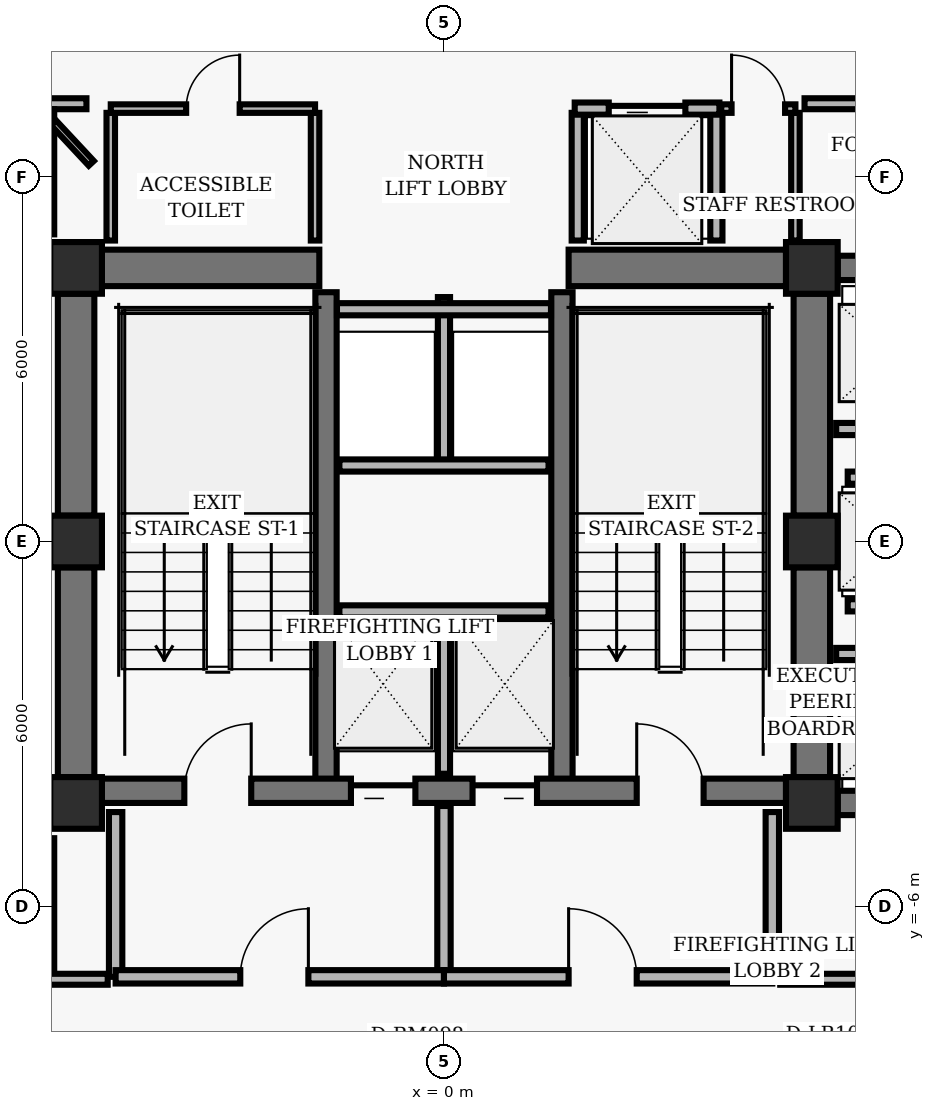
"""IFC4 building model, lengths in metres.
Left out: names, types, materials, properties, quantities, classifications, styles, units other than length and angle.
Written with IfcOpenShell. Run it as: python <this file> out.ifc"""

import sys

from ifc_helpers import new_model, si_unit, direction, frame, frame_2d, origin, origin_2d, place, context, subcontext, project, spatial, rectangle, hollow_rectangle, extrude, element, fill, save


model = new_model("IFC4")
c1 = context("Model", 3, precision=1e-05, world=origin(), true_north=direction((0.0, 1.0)))
c2 = subcontext(c1, "Body", "Model", "MODEL_VIEW")
j1 = project(units=[si_unit("LENGTHUNIT", "METRE"), si_unit("PLANEANGLEUNIT", "RADIAN")], contexts=[c1])
p1 = place(None, origin())
s1 = spatial("IfcSite", under=j1, at=p1, CompositionType="ELEMENT")
p2 = place(p1, origin())
s2 = spatial("IfcBuilding", under=s1, at=p2, CompositionType="ELEMENT")
p3 = place(p2, frame((0.0, 0.0, 159.36)))
s3 = spatial("IfcBuildingStorey", under=s2, at=p3, CompositionType="ELEMENT", Elevation=159.36)
for number, where, z_axis, x_axis in (
    (1, (-6.05, 4.5, 0.0), (0.0, 0.0, 1.0), (1.0, 0.0, 0.0)),
    (2, (6.05, 4.5, 0.0), (0.0, 0.0, 1.0), (1.0, 0.0, 0.0)),
    (3, (-6.05, 0.0, 0.0), (0.0, 0.0, 1.0), (1.0, 0.0, 0.0)),
    (4, (6.05, 0.0, 0.0), (0.0, 0.0, 1.0), (1.0, 0.0, 0.0)),
    (5, (-6.05, -4.3, 0.0), (0.0, 0.0, 1.0), (1.0, 0.0, 0.0)),
    (6, (6.05, -4.3, 0.0), (0.0, 0.0, 1.0), (1.0, 0.0, 0.0)),
):
    element("IfcColumn", number, at=place(p3, frame(where, z_axis=z_axis, x_axis=x_axis)), inside=s3, PredefinedType="COLUMN", context=c2, shape_type="SweptSolid", body=[
        extrude(hollow_rectangle(XDim=0.85, YDim=0.85, WallThickness=0.055, InnerFilletRadius=0.02, OuterFilletRadius=0.04, at=origin_2d()), origin(), (0.0, 0.0, 1.0), 3.04),
    ])
p4 = place(p3, frame((-6.05, 0.425, 0.0), z_axis=(0.0, 0.0, 1.0), x_axis=(0.0, 1.0, 0.0)))
e7 = element("IfcWall", 7, at=p4, inside=s3, PredefinedType="SHEAR", context=c2, shape_type="SweptSolid", body=[
    extrude(rectangle(XDim=3.65, YDim=0.6, at=frame_2d((1.825, 0.0))), origin(), (0.0, 0.0, 1.0), 2.788),
])
p5 = place(p3, frame((-6.05, -3.875, 0.0), z_axis=(0.0, 0.0, 1.0), x_axis=(0.0, 1.0, 0.0)))
e8 = element("IfcWall", 8, at=p5, inside=s3, PredefinedType="SHEAR", context=c2, shape_type="SweptSolid", body=[
    extrude(rectangle(XDim=3.45, YDim=0.6, at=frame_2d((1.725, 0.0))), origin(), (0.0, 0.0, 1.0), 2.788),
])
p6 = place(p3, frame((6.05, 0.425, 0.0), z_axis=(0.0, 0.0, 1.0), x_axis=(0.0, 1.0, 0.0)))
e9 = element("IfcWall", 9, at=p6, inside=s3, PredefinedType="SHEAR", context=c2, shape_type="SweptSolid", body=[
    extrude(rectangle(XDim=3.65, YDim=0.6, at=frame_2d((1.825, 0.0))), origin(), (0.0, 0.0, 1.0), 2.788),
])
p7 = place(p3, frame((6.05, -3.875, 0.0), z_axis=(0.0, 0.0, 1.0), x_axis=(0.0, 1.0, 0.0)))
e10 = element("IfcWall", 10, at=p7, inside=s3, PredefinedType="SHEAR", context=c2, shape_type="SweptSolid", body=[
    extrude(rectangle(XDim=3.45, YDim=0.6, at=frame_2d((1.725, 0.0))), origin(), (0.0, 0.0, 1.0), 2.788),
])
for number, where, z_axis, x_axis in (
    (11, (-1.94, -4.1, 0.0), (0.0, 0.0, 1.0), (0.0, 1.0, 0.0)),
    (12, (1.94, -4.1, 0.0), (0.0, 0.0, 1.0), (0.0, 1.0, 0.0)),
):
    element("IfcWall", number, at=place(p3, frame(where, z_axis=z_axis, x_axis=x_axis)), inside=s3, PredefinedType="SHEAR", context=c2, shape_type="SweptSolid", body=[
        extrude(rectangle(XDim=8.2, YDim=0.35, at=frame_2d((4.1, 0.0))), origin(), (0.0, 0.0, 1.0), 2.788),
    ])
p8 = place(p3, frame((-5.625, -4.1, 0.0), z_axis=(0.0, 0.0, 1.0), x_axis=(1.0, 0.0, 0.0)))
e13 = element("IfcWall", 13, at=p8, inside=s3, PredefinedType="SHEAR", context=c2, shape_type="SweptSolid", body=[
    extrude(rectangle(XDim=11.25, YDim=0.4, at=frame_2d((5.625, 0.0))), origin(), (0.0, 0.0, 1.0), 2.788),
])
p9 = place(p8, frame((1.355, 0.0, 0.0)))
e14 = element("IfcOpeningElement", 14, at=p9, cuts=e13, PredefinedType="OPENING", context=c2, shape_type="SweptSolid", body=[
    extrude(rectangle(XDim=1.1, YDim=2.04, at=frame_2d((0.55, 1.02))), frame((0.0, 0.21, 0.0), z_axis=(0.0, -1.0, 0.0), x_axis=(1.0, 0.0, 0.0)), (0.0, 0.0, 1.0), 0.42),
])
p10 = place(p8, frame((8.795, 0.0, 0.0)))
e15 = element("IfcOpeningElement", 15, at=p10, cuts=e13, PredefinedType="OPENING", context=c2, shape_type="SweptSolid", body=[
    extrude(rectangle(XDim=1.1, YDim=2.04, at=frame_2d((0.55, 1.02))), frame((0.0, 0.21, 0.0), z_axis=(0.0, -1.0, 0.0), x_axis=(1.0, 0.0, 0.0)), (0.0, 0.0, 1.0), 0.42),
])
p11 = place(p8, frame((4.095, 0.0, 0.0)))
e16 = element("IfcOpeningElement", 16, at=p11, cuts=e13, PredefinedType="OPENING", context=c2, shape_type="SweptSolid", body=[
    extrude(rectangle(XDim=1.06, YDim=2.04, at=frame_2d((0.53, 1.02))), frame((0.0, 0.21, 0.0), z_axis=(0.0, -1.0, 0.0), x_axis=(1.0, 0.0, 0.0)), (0.0, 0.0, 1.0), 0.42),
])
p12 = place(p8, frame((6.095, 0.0, 0.0)))
e17 = element("IfcOpeningElement", 17, at=p12, cuts=e13, PredefinedType="OPENING", context=c2, shape_type="SweptSolid", body=[
    extrude(rectangle(XDim=1.06, YDim=2.04, at=frame_2d((0.53, 1.02))), frame((0.0, 0.21, 0.0), z_axis=(0.0, -1.0, 0.0), x_axis=(1.0, 0.0, 0.0)), (0.0, 0.0, 1.0), 0.42),
])
for number, where, z_axis, x_axis in (
    (18, (-5.625, 4.5, 0.0), (0.0, 0.0, 1.0), (1.0, 0.0, 0.0)),
    (19, (2.05, 4.5, 0.0), (0.0, 0.0, 1.0), (1.0, 0.0, 0.0)),
):
    element("IfcWall", number, at=place(p3, frame(where, z_axis=z_axis, x_axis=x_axis)), inside=s3, PredefinedType="SHEAR", context=c2, shape_type="SweptSolid", body=[
        extrude(rectangle(XDim=3.575, YDim=0.6, at=frame_2d((1.788, 0.0))), origin(), (0.0, 0.0, 1.0), 2.788),
    ])
for number, where, z_axis, x_axis in (
    (20, (6.475, 4.5, 0.0), (0.0, 0.0, 1.0), (1.0, 0.0, 0.0)),
    (21, (6.475, -4.3, 0.0), (0.0, 0.0, 1.0), (1.0, 0.0, 0.0)),
):
    element("IfcWall", number, at=place(p3, frame(where, z_axis=z_axis, x_axis=x_axis)), inside=s3, PredefinedType="SHEAR", context=c2, shape_type="SweptSolid", body=[
        extrude(rectangle(XDim=2.05, YDim=0.4, at=frame_2d((1.025, 0.0))), origin(), (0.0, 0.0, 1.0), 2.788),
    ])
p13 = place(p3, frame((0.0, -3.82, 0.0), z_axis=(0.0, 0.0, 1.0), x_axis=(0.0, 1.0, 0.0)))
e22 = element("IfcWall", 22, at=p13, inside=s3, PredefinedType="PARTITIONING", context=c2, shape_type="SweptSolid", body=[
    extrude(rectangle(XDim=2.67, YDim=0.2, at=frame_2d((1.335, 0.0))), origin(), (0.0, 0.0, 1.0), 2.763),
])
p14 = place(p3, frame((-1.72, -1.15, 0.0), z_axis=(0.0, 0.0, 1.0), x_axis=(1.0, 0.0, 0.0)))
e23 = element("IfcWall", 23, at=p14, inside=s3, PredefinedType="PARTITIONING", context=c2, shape_type="SweptSolid", body=[
    extrude(rectangle(XDim=3.44, YDim=0.2, at=frame_2d((1.72, 0.0))), origin(), (0.0, 0.0, 1.0), 2.763),
])
for number, where, z_axis, x_axis in (
    (24, (-5.4, -7.16, 0.0), (0.0, 0.0, 1.0), (0.0, 1.0, 0.0)),
    (25, (5.4, -7.16, 0.0), (0.0, 0.0, 1.0), (0.0, 1.0, 0.0)),
):
    element("IfcWall", number, at=place(p3, frame(where, z_axis=z_axis, x_axis=x_axis)), inside=s3, PredefinedType="PARTITIONING", context=c2, shape_type="SweptSolid", body=[
        extrude(rectangle(XDim=2.71, YDim=0.22, at=frame_2d((1.355, 0.0))), origin(), (0.0, 0.0, 1.0), 2.763),
    ])
p15 = place(p3, frame((0.0, -7.16, 0.0), z_axis=(0.0, 0.0, 1.0), x_axis=(0.0, 1.0, 0.0)))
e26 = element("IfcWall", 26, at=p15, inside=s3, PredefinedType="PARTITIONING", context=c2, shape_type="SweptSolid", body=[
    extrude(rectangle(XDim=2.81, YDim=0.22, at=frame_2d((1.405, 0.0))), origin(), (0.0, 0.0, 1.0), 2.763),
])
p16 = place(p3, frame((-5.4, -7.16, 0.0), z_axis=(0.0, 0.0, 1.0), x_axis=(1.0, 0.0, 0.0)))
e27 = element("IfcWall", 27, at=p16, inside=s3, PredefinedType="PARTITIONING", context=c2, shape_type="SweptSolid", body=[
    extrude(rectangle(XDim=5.4, YDim=0.22, at=frame_2d((2.7, 0.0))), origin(), (0.0, 0.0, 1.0), 2.33),
])
p17 = place(p16, frame((2.05, 0.0, 0.0)))
e28 = element("IfcOpeningElement", 28, at=p17, cuts=e27, PredefinedType="OPENING", context=c2, shape_type="SweptSolid", body=[
    extrude(rectangle(XDim=1.12, YDim=2.02, at=frame_2d((0.56, 1.01))), frame((0.0, 0.12, 0.0), z_axis=(0.0, -1.0, 0.0), x_axis=(1.0, 0.0, 0.0)), (0.0, 0.0, 1.0), 0.24),
])
p18 = place(p3, frame((0.0, -7.16, 0.0), z_axis=(0.0, 0.0, 1.0), x_axis=(1.0, 0.0, 0.0)))
e29 = element("IfcWall", 29, at=p18, inside=s3, PredefinedType="PARTITIONING", context=c2, shape_type="SweptSolid", body=[
    extrude(rectangle(XDim=5.4, YDim=0.22, at=frame_2d((2.7, 0.0))), origin(), (0.0, 0.0, 1.0), 2.33),
])
p19 = place(p18, frame((2.05, 0.0, 0.0)))
e30 = element("IfcOpeningElement", 30, at=p19, cuts=e29, PredefinedType="OPENING", context=c2, shape_type="SweptSolid", body=[
    extrude(rectangle(XDim=1.12, YDim=2.02, at=frame_2d((0.56, 1.01))), frame((0.0, 0.12, 0.0), z_axis=(0.0, -1.0, 0.0), x_axis=(1.0, 0.0, 0.0)), (0.0, 0.0, 1.0), 0.24),
])
p20 = place(p3, frame((0.0, 1.25, 0.0), z_axis=(0.0, 0.0, 1.0), x_axis=(0.0, 1.0, 0.0)))
e31 = element("IfcWall", 31, at=p20, inside=s3, PredefinedType="PARTITIONING", context=c2, shape_type="SweptSolid", body=[
    extrude(rectangle(XDim=2.77, YDim=0.2, at=frame_2d((1.385, 0.0))), origin(), (0.0, 0.0, 1.0), 2.763),
])
p21 = place(p3, frame((-1.72, 1.25, 0.0), z_axis=(0.0, 0.0, 1.0), x_axis=(1.0, 0.0, 0.0)))
e32 = element("IfcWall", 32, at=p21, inside=s3, PredefinedType="PARTITIONING", context=c2, shape_type="SweptSolid", body=[
    extrude(rectangle(XDim=3.44, YDim=0.2, at=frame_2d((1.72, 0.0))), origin(), (0.0, 0.0, 1.0), 2.763),
])
p22 = place(p3, frame((-1.76, 3.82, 0.0), z_axis=(0.0, 0.0, 1.0), x_axis=(1.0, 0.0, 0.0)))
e33 = element("IfcWall", 33, at=p22, inside=s3, PredefinedType="PARTITIONING", context=c2, shape_type="SweptSolid", body=[
    extrude(rectangle(XDim=3.52, YDim=0.2, at=frame_2d((1.76, 0.0))), origin(), (0.0, 0.0, 1.0), 2.763),
])
for number, where, z_axis, x_axis in (
    (34, (2.2, 4.95, 0.0), (0.0, 0.0, 1.0), (0.0, 1.0, 0.0)),
    (35, (4.48, 4.95, 0.0), (0.0, 0.0, 1.0), (0.0, 1.0, 0.0)),
):
    element("IfcWall", number, at=place(p3, frame(where, z_axis=z_axis, x_axis=x_axis)), inside=s3, PredefinedType="PARTITIONING", context=c2, shape_type="SweptSolid", body=[
        extrude(rectangle(XDim=2.1, YDim=0.2, at=frame_2d((1.05, 0.0))), origin(), (0.0, 0.0, 1.0), 2.763),
    ])
p23 = place(p3, frame((2.15, 7.12, 0.0), z_axis=(0.0, 0.0, 1.0), x_axis=(1.0, 0.0, 0.0)))
e36 = element("IfcWall", 36, at=p23, inside=s3, PredefinedType="PARTITIONING", context=c2, shape_type="SweptSolid", body=[
    extrude(rectangle(XDim=2.38, YDim=0.2, at=frame_2d((1.19, 0.0))), origin(), (0.0, 0.0, 1.0), 2.763),
])
p24 = place(p23, frame((0.56, 0.0, 0.0)))
e37 = element("IfcOpeningElement", 37, at=p24, cuts=e36, PredefinedType="OPENING", context=c2, shape_type="SweptSolid", body=[
    extrude(rectangle(XDim=1.26, YDim=2.06, at=frame_2d((0.63, 1.03))), frame((0.0, 0.11, 0.0), z_axis=(0.0, -1.0, 0.0), x_axis=(1.0, 0.0, 0.0)), (0.0, 0.0, 1.0), 0.22),
])
for number, where, z_axis, x_axis in (
    (38, (-5.48, 4.95, 0.0), (0.0, 0.0, 1.0), (0.0, 1.0, 0.0)),
    (39, (-2.12, 4.95, 0.0), (0.0, 0.0, 1.0), (0.0, 1.0, 0.0)),
):
    element("IfcWall", number, at=place(p3, frame(where, z_axis=z_axis, x_axis=x_axis)), inside=s3, PredefinedType="PARTITIONING", context=c2, shape_type="SweptSolid", body=[
        extrude(rectangle(XDim=2.1, YDim=0.14, at=frame_2d((1.05, 0.0))), origin(), (0.0, 0.0, 1.0), 2.763),
    ])
p25 = place(p3, frame((-5.48, 7.12, 0.0), z_axis=(0.0, 0.0, 1.0), x_axis=(1.0, 0.0, 0.0)))
e40 = element("IfcWall", 40, at=p25, inside=s3, PredefinedType="PARTITIONING", context=c2, shape_type="SweptSolid", body=[
    extrude(rectangle(XDim=3.36, YDim=0.14, at=frame_2d((1.68, 0.0))), origin(), (0.0, 0.0, 1.0), 2.763),
])
p26 = place(p25, frame((1.24, 0.0, 0.0)))
e41 = element("IfcOpeningElement", 41, at=p26, cuts=e40, PredefinedType="OPENING", context=c2, shape_type="SweptSolid", body=[
    extrude(rectangle(XDim=0.88, YDim=2.02, at=frame_2d((0.44, 1.01))), frame((0.0, 0.08, 0.0), z_axis=(0.0, -1.0, 0.0), x_axis=(1.0, 0.0, 0.0)), (0.0, 0.0, 1.0), 0.16),
])
p27 = place(p3, frame((5.78, 4.95, 0.0), z_axis=(0.0, 0.0, 1.0), x_axis=(0.0, 1.0, 0.0)))
e42 = element("IfcWall", 42, at=p27, inside=s3, PredefinedType="PARTITIONING", context=c2, shape_type="SweptSolid", body=[
    extrude(rectangle(XDim=2.1, YDim=0.14, at=frame_2d((1.05, 0.0))), origin(), (0.0, 0.0, 1.0), 2.763),
])
p28 = place(p3, frame((4.56, 7.12, 0.0), z_axis=(0.0, 0.0, 1.0), x_axis=(1.0, 0.0, 0.0)))
e43 = element("IfcWall", 43, at=p28, inside=s3, PredefinedType="PARTITIONING", context=c2, shape_type="SweptSolid", body=[
    extrude(rectangle(XDim=1.22, YDim=0.14, at=frame_2d((0.61, 0.0))), origin(), (0.0, 0.0, 1.0), 2.763),
])
p29 = place(p28, frame((0.17, 0.0, 0.0)))
e44 = element("IfcOpeningElement", 44, at=p29, cuts=e43, PredefinedType="OPENING", context=c2, shape_type="SweptSolid", body=[
    extrude(rectangle(XDim=0.88, YDim=2.02, at=frame_2d((0.44, 1.01))), frame((0.0, 0.08, 0.0), z_axis=(0.0, -1.0, 0.0), x_axis=(1.0, 0.0, 0.0)), (0.0, 0.0, 1.0), 0.16),
])
for number, where, z_axis, x_axis in (
    (45, (6.45, -1.85, 0.0), (0.0, 0.0, 1.0), (1.0, 0.0, 0.0)),
    (46, (6.45, 1.85, 0.0), (0.0, 0.0, 1.0), (1.0, 0.0, 0.0)),
):
    element("IfcWall", number, at=place(p3, frame(where, z_axis=z_axis, x_axis=x_axis)), inside=s3, PredefinedType="PARTITIONING", context=c2, shape_type="SweptSolid", body=[
        extrude(rectangle(XDim=2.1, YDim=0.2, at=frame_2d((1.05, 0.0))), origin(), (0.0, 0.0, 1.0), 2.763),
    ])
for number, where, z_axis, x_axis in (
    (47, (6.64, -1.05, 0.0), (0.0, 0.0, 1.0), (1.0, 0.0, 0.0)),
    (48, (6.64, 1.05, 0.0), (0.0, 0.0, 1.0), (1.0, 0.0, 0.0)),
):
    element("IfcWall", number, at=place(p3, frame(where, z_axis=z_axis, x_axis=x_axis)), inside=s3, PredefinedType="PARTITIONING", context=c2, shape_type="SweptSolid", body=[
        extrude(rectangle(XDim=1.91, YDim=0.2, at=frame_2d((0.955, 0.0))), origin(), (0.0, 0.0, 1.0), 2.763),
    ])
p30 = place(p3, frame((10.814, 7.2, 0.0), z_axis=(0.0, 0.0, 1.0), x_axis=(-1.0, 0.0, 0.0)))
e49 = element("IfcWall", 49, at=p30, inside=s3, PredefinedType="PARTITIONING", context=c2, shape_type="SweptSolid", body=[
    extrude(rectangle(XDim=4.884, YDim=0.18, at=frame_2d((2.442, 0.0))), origin(), (0.0, 0.0, 1.0), 2.763),
])
p31 = place(p3, frame((-5.88, 7.2, 0.0), z_axis=(0.0, 0.0, 1.0), x_axis=(-1.0, 0.0, 0.0)))
e50 = element("IfcWall", 50, at=p31, inside=s3, PredefinedType="PARTITIONING", context=c2, shape_type="SweptSolid", body=[
    extrude(rectangle(XDim=0.71, YDim=0.18, at=frame_2d((0.355, 0.0))), origin(), (0.0, 0.0, 1.0), 2.763),
])
p32 = place(p3, frame((-6.5, 7.11, 0.0), z_axis=(0.0, 0.0, 1.0), x_axis=(0.0, -1.0, 0.0)))
e51 = element("IfcWall", 51, at=p32, inside=s3, PredefinedType="PARTITIONING", context=c2, shape_type="SweptSolid", body=[
    extrude(rectangle(XDim=2.058, YDim=0.18, at=frame_2d((1.029, 0.0))), origin(), (0.0, 0.0, 1.0), 2.763),
])
p33 = place(p3, frame((-6.5, -4.88, 0.0), z_axis=(0.0, 0.0, 1.0), x_axis=(0.0, -1.0, 0.0)))
e52 = element("IfcWall", 52, at=p33, inside=s3, PredefinedType="PARTITIONING", context=c2, shape_type="SweptSolid", body=[
    extrude(rectangle(XDim=2.23, YDim=0.18, at=frame_2d((1.115, 0.0))), origin(), (0.0, 0.0, 1.0), 2.763),
])
p34 = place(p3, frame((-6.59, -7.2, 0.0), z_axis=(0.0, 0.0, 1.0), x_axis=(1.0, 0.0, 0.0)))
e53 = element("IfcWall", 53, at=p34, inside=s3, PredefinedType="PARTITIONING", context=c2, shape_type="SweptSolid", body=[
    extrude(rectangle(XDim=1.06, YDim=0.18, at=frame_2d((0.53, 0.0))), origin(), (0.0, 0.0, 1.0), 2.763),
])
p35 = place(p3, frame((5.53, -7.2, 0.0), z_axis=(0.0, 0.0, 1.0), x_axis=(1.0, 0.0, 0.0)))
e54 = element("IfcWall", 54, at=p35, inside=s3, PredefinedType="PARTITIONING", context=c2, shape_type="SweptSolid", body=[
    extrude(rectangle(XDim=5.52, YDim=0.18, at=frame_2d((2.76, 0.0))), origin(), (0.0, 0.0, 1.0), 2.33),
])
p36 = place(p35, frame((2.28, 0.0, 0.0)))
e55 = element("IfcOpeningElement", 55, at=p36, cuts=e54, PredefinedType="OPENING", context=c2, shape_type="SweptSolid", body=[
    extrude(rectangle(XDim=0.96, YDim=2.02, at=frame_2d((0.48, 1.01))), frame((0.0, 0.1, 0.0), z_axis=(0.0, -1.0, 0.0), x_axis=(1.0, 0.0, 0.0)), (0.0, 0.0, 1.0), 0.2),
])
p37 = place(p3, frame((-5.8, 6.22, 0.0), z_axis=(0.0, 0.0, 1.0), x_axis=(-0.681964083565, 0.731385663469, 0.0)))
e56 = element("IfcWall", 56, at=p37, inside=s3, PredefinedType="MOVABLE", context=c2, shape_type="SweptSolid", body=[
    extrude(rectangle(XDim=0.909, YDim=0.115, at=frame_2d((0.455, 0.0))), origin(), (0.0, 0.0, 1.0), 2.763),
])
p38 = place(p9, origin())
e57 = element("IfcDoor", 57, at=p38, inside=s3, OperationType="SINGLE_SWING_RIGHT", PredefinedType="DOOR", context=c2, shape_type="SweptSolid", body=[
    extrude(rectangle(XDim=1.1, YDim=2.04, at=frame_2d((0.55, 1.02))), frame((0.0, 0.025, 0.0), z_axis=(0.0, -1.0, 0.0), x_axis=(1.0, 0.0, 0.0)), (0.0, 0.0, 1.0), 0.05),
])
fill(e14, e57)
p39 = place(p10, origin())
e58 = element("IfcDoor", 58, at=p39, inside=s3, OperationType="SINGLE_SWING_LEFT", PredefinedType="DOOR", context=c2, shape_type="SweptSolid", body=[
    extrude(rectangle(XDim=1.1, YDim=2.04, at=frame_2d((0.55, 1.02))), frame((0.0, 0.025, 0.0), z_axis=(0.0, -1.0, 0.0), x_axis=(1.0, 0.0, 0.0)), (0.0, 0.0, 1.0), 0.05),
])
fill(e15, e58)
p40 = place(p11, origin())
e59 = element("IfcDoor", 59, at=p40, inside=s3, OperationType="SLIDING_TO_LEFT", PredefinedType="DOOR", context=c2, shape_type="SweptSolid", body=[
    extrude(rectangle(XDim=1.06, YDim=2.04, at=frame_2d((0.53, 1.02))), frame((0.0, 0.025, 0.0), z_axis=(0.0, -1.0, 0.0), x_axis=(1.0, 0.0, 0.0)), (0.0, 0.0, 1.0), 0.05),
])
fill(e16, e59)
p41 = place(p12, origin())
e60 = element("IfcDoor", 60, at=p41, inside=s3, OperationType="SLIDING_TO_RIGHT", PredefinedType="DOOR", context=c2, shape_type="SweptSolid", body=[
    extrude(rectangle(XDim=1.06, YDim=2.04, at=frame_2d((0.53, 1.02))), frame((0.0, 0.025, 0.0), z_axis=(0.0, -1.0, 0.0), x_axis=(1.0, 0.0, 0.0)), (0.0, 0.0, 1.0), 0.05),
])
fill(e17, e60)
p42 = place(p17, origin())
e61 = element("IfcDoor", 61, at=p42, inside=s3, OperationType="SINGLE_SWING_RIGHT", PredefinedType="DOOR", context=c2, shape_type="SweptSolid", body=[
    extrude(rectangle(XDim=1.12, YDim=2.02, at=frame_2d((0.56, 1.01))), frame((0.0, 0.025, 0.0), z_axis=(0.0, -1.0, 0.0), x_axis=(1.0, 0.0, 0.0)), (0.0, 0.0, 1.0), 0.05),
])
fill(e28, e61)
p43 = place(p19, origin())
e62 = element("IfcDoor", 62, at=p43, inside=s3, OperationType="SINGLE_SWING_LEFT", PredefinedType="DOOR", context=c2, shape_type="SweptSolid", body=[
    extrude(rectangle(XDim=1.12, YDim=2.02, at=frame_2d((0.56, 1.01))), frame((0.0, 0.025, 0.0), z_axis=(0.0, -1.0, 0.0), x_axis=(1.0, 0.0, 0.0)), (0.0, 0.0, 1.0), 0.05),
])
fill(e30, e62)
p44 = place(p24, origin())
e63 = element("IfcDoor", 63, at=p44, inside=s3, OperationType="SLIDING_TO_LEFT", PredefinedType="DOOR", context=c2, shape_type="SweptSolid", body=[
    extrude(rectangle(XDim=1.26, YDim=2.06, at=frame_2d((0.63, 1.03))), frame((0.0, 0.025, 0.0), z_axis=(0.0, -1.0, 0.0), x_axis=(1.0, 0.0, 0.0)), (0.0, 0.0, 1.0), 0.05),
])
fill(e37, e63)
p45 = place(p26, origin())
e64 = element("IfcDoor", 64, at=p45, inside=s3, OperationType="SINGLE_SWING_RIGHT", PredefinedType="DOOR", context=c2, shape_type="SweptSolid", body=[
    extrude(rectangle(XDim=0.88, YDim=2.02, at=frame_2d((0.44, 1.01))), frame((0.0, 0.025, 0.0), z_axis=(0.0, -1.0, 0.0), x_axis=(1.0, 0.0, 0.0)), (0.0, 0.0, 1.0), 0.05),
])
fill(e41, e64)
p46 = place(p29, origin())
e65 = element("IfcDoor", 65, at=p46, inside=s3, OperationType="SINGLE_SWING_LEFT", PredefinedType="DOOR", context=c2, shape_type="SweptSolid", body=[
    extrude(rectangle(XDim=0.88, YDim=2.02, at=frame_2d((0.44, 1.01))), frame((0.0, 0.025, 0.0), z_axis=(0.0, -1.0, 0.0), x_axis=(1.0, 0.0, 0.0)), (0.0, 0.0, 1.0), 0.05),
])
fill(e44, e65)
save(model, sys.argv[1])
